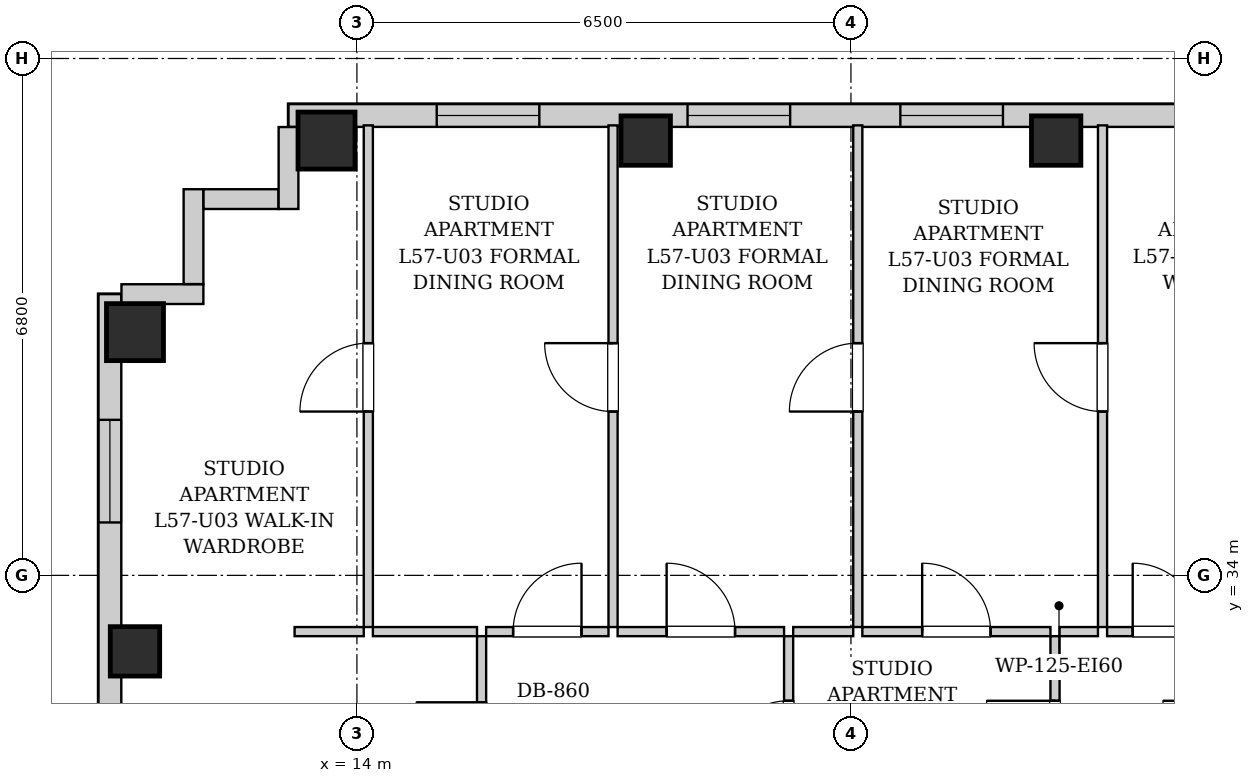
"""IFC4 building model, lengths in metres.
Left out: names, types, materials, properties, quantities, classifications, styles, units other than length and angle.
Written with IfcOpenShell. Run it as: python <this file> out.ifc"""

import sys

from ifc_helpers import new_model, si_unit, direction, frame, frame_2d, origin, origin_2d, place, context, subcontext, project, spatial, rectangle, extrude, element, fill, save


model = new_model("IFC4")
c1 = context("Model", 3, precision=1e-05, world=origin(), true_north=direction((0.0, 1.0)))
c2 = subcontext(c1, "Body", "Model", "MODEL_VIEW")
j1 = project(units=[si_unit("LENGTHUNIT", "METRE"), si_unit("PLANEANGLEUNIT", "RADIAN")], contexts=[c1])
p1 = place(None, origin())
s1 = spatial("IfcSite", under=j1, at=p1, CompositionType="ELEMENT")
p2 = place(p1, origin())
s2 = spatial("IfcBuilding", under=s1, at=p2, CompositionType="ELEMENT")
p3 = place(p2, frame((0.0, 0.0, 197.5)))
s3 = spatial("IfcBuildingStorey", under=s2, at=p3, CompositionType="ELEMENT", Elevation=197.5)
p4 = place(p3, frame((13.6, 39.72, 0.0), z_axis=(0.0, 0.0, 1.0), x_axis=(1.0, 0.0, 0.0)))
e1 = element("IfcColumn", 1, at=p4, inside=s3, PredefinedType="COLUMN", context=c2, shape_type="SweptSolid", body=[
    extrude(rectangle(XDim=0.75, YDim=0.75, at=origin_2d()), origin(), (0.0, 0.0, 1.0), 3.3),
])
for number, where, z_axis, x_axis in (
    (2, (17.8, 39.72, 0.0), (0.0, 0.0, 1.0), (1.0, 0.0, 0.0)),
    (3, (23.2, 39.72, 0.0), (0.0, 0.0, 1.0), (1.0, 0.0, 0.0)),
    (4, (11.08, 33.0, 0.0), (0.0, 0.0, 1.0), (1.0, 0.0, 0.0)),
):
    element("IfcColumn", number, at=place(p3, frame(where, z_axis=z_axis, x_axis=x_axis)), inside=s3, PredefinedType="COLUMN", context=c2, shape_type="SweptSolid", body=[
        extrude(rectangle(XDim=0.65, YDim=0.65, at=origin_2d()), origin(), (0.0, 0.0, 1.0), 3.3),
    ])
p5 = place(p3, frame((11.08, 37.2, 0.0), z_axis=(0.0, 0.0, 1.0), x_axis=(1.0, 0.0, 0.0)))
e5 = element("IfcColumn", 5, at=p5, inside=s3, PredefinedType="COLUMN", context=c2, shape_type="SweptSolid", body=[
    extrude(rectangle(XDim=0.75, YDim=0.75, at=origin_2d()), origin(), (0.0, 0.0, 1.0), 3.3),
])
p6 = place(p3, frame((13.1, 40.05, 0.0), z_axis=(0.0, 0.0, 1.0), x_axis=(1.0, 0.0, 0.0)))
e6 = element("IfcWall", 6, at=p6, inside=s3, PredefinedType="SOLIDWALL", context=c2, shape_type="SweptSolid", body=[
    extrude(rectangle(XDim=17.7, YDim=0.3, at=frame_2d((8.85, 0.0))), origin(), (0.0, 0.0, 1.0), 3.04),
])
p7 = place(p6, frame((1.95, 0.0, 0.55)))
e7 = element("IfcOpeningElement", 7, at=p7, cuts=e6, PredefinedType="OPENING", context=c2, shape_type="SweptSolid", body=[
    extrude(rectangle(XDim=1.35, YDim=1.2, at=frame_2d((0.675, 0.6))), frame((0.0, 0.16, 0.0), z_axis=(0.0, -1.0, 0.0), x_axis=(1.0, 0.0, 0.0)), (0.0, 0.0, 1.0), 0.32),
])
p8 = place(p6, frame((5.25, 0.0, 0.55)))
e8 = element("IfcOpeningElement", 8, at=p8, cuts=e6, PredefinedType="OPENING", context=c2, shape_type="SweptSolid", body=[
    extrude(rectangle(XDim=1.35, YDim=1.2, at=frame_2d((0.675, 0.6))), frame((0.0, 0.16, 0.0), z_axis=(0.0, -1.0, 0.0), x_axis=(1.0, 0.0, 0.0)), (0.0, 0.0, 1.0), 0.32),
])
p9 = place(p6, frame((8.05, 0.0, 0.55)))
e9 = element("IfcOpeningElement", 9, at=p9, cuts=e6, PredefinedType="OPENING", context=c2, shape_type="SweptSolid", body=[
    extrude(rectangle(XDim=1.35, YDim=1.2, at=frame_2d((0.675, 0.6))), frame((0.0, 0.16, 0.0), z_axis=(0.0, -1.0, 0.0), x_axis=(1.0, 0.0, 0.0)), (0.0, 0.0, 1.0), 0.32),
])
p10 = place(p6, frame((14.85, 0.0, 0.55)))
e10 = element("IfcOpeningElement", 10, at=p10, cuts=e6, PredefinedType="OPENING", context=c2, shape_type="SweptSolid", body=[
    extrude(rectangle(XDim=1.35, YDim=1.2, at=frame_2d((0.675, 0.6))), frame((0.0, 0.16, 0.0), z_axis=(0.0, -1.0, 0.0), x_axis=(1.0, 0.0, 0.0)), (0.0, 0.0, 1.0), 0.32),
])
p11 = place(p3, frame((10.75, 6.3, 0.0), z_axis=(0.0, 0.0, 1.0), x_axis=(0.0, 1.0, 0.0)))
e11 = element("IfcWall", 11, at=p11, inside=s3, PredefinedType="SOLIDWALL", context=c2, shape_type="SweptSolid", body=[
    extrude(rectangle(XDim=31.4, YDim=0.3, at=frame_2d((15.7, 0.0))), origin(), (0.0, 0.0, 1.0), 3.04),
])
p12 = place(p11, frame((1.653, 0.0, 0.55)))
e12 = element("IfcOpeningElement", 12, at=p12, cuts=e11, PredefinedType="OPENING", context=c2, shape_type="SweptSolid", body=[
    extrude(rectangle(XDim=1.35, YDim=1.2, at=frame_2d((0.675, 0.6))), frame((0.0, 0.16, 0.0), z_axis=(0.0, -1.0, 0.0), x_axis=(1.0, 0.0, 0.0)), (0.0, 0.0, 1.0), 0.32),
])
p13 = place(p11, frame((28.396, 0.0, 0.55)))
e13 = element("IfcOpeningElement", 13, at=p13, cuts=e11, PredefinedType="OPENING", context=c2, shape_type="SweptSolid", body=[
    extrude(rectangle(XDim=1.35, YDim=1.2, at=frame_2d((0.675, 0.6))), frame((0.0, 0.16, 0.0), z_axis=(0.0, -1.0, 0.0), x_axis=(1.0, 0.0, 0.0)), (0.0, 0.0, 1.0), 0.32),
])
p14 = place(p11, frame((10.367, 0.0, 0.55)))
e14 = element("IfcOpeningElement", 14, at=p14, cuts=e11, PredefinedType="OPENING", context=c2, shape_type="SweptSolid", body=[
    extrude(rectangle(XDim=1.35, YDim=1.2, at=frame_2d((0.675, 0.6))), frame((0.0, 0.16, 0.0), z_axis=(0.0, -1.0, 0.0), x_axis=(1.0, 0.0, 0.0)), (0.0, 0.0, 1.0), 0.32),
])
p15 = place(p11, frame((19.683, 0.0, 0.55)))
e15 = element("IfcOpeningElement", 15, at=p15, cuts=e11, PredefinedType="OPENING", context=c2, shape_type="SweptSolid", body=[
    extrude(rectangle(XDim=1.35, YDim=1.2, at=frame_2d((0.675, 0.6))), frame((0.0, 0.16, 0.0), z_axis=(0.0, -1.0, 0.0), x_axis=(1.0, 0.0, 0.0)), (0.0, 0.0, 1.0), 0.32),
])
p16 = place(p3, frame((10.902, 37.7, 0.0), z_axis=(0.0, 0.0, 1.0), x_axis=(1.0, 0.0, 0.0)))
e16 = element("IfcWall", 16, at=p16, inside=s3, PredefinedType="SOLIDWALL", context=c2, shape_type="SweptSolid", body=[
    extrude(rectangle(XDim=1.078, YDim=0.26, at=frame_2d((0.539, 0.0))), origin(), (0.0, 0.0, 1.0), 3.04),
])
p17 = place(p3, frame((11.85, 37.832, 0.0), z_axis=(0.0, 0.0, 1.0), x_axis=(0.0, 1.0, 0.0)))
e17 = element("IfcWall", 17, at=p17, inside=s3, PredefinedType="SOLIDWALL", context=c2, shape_type="SweptSolid", body=[
    extrude(rectangle(XDim=1.248, YDim=0.26, at=frame_2d((0.624, 0.0))), origin(), (0.0, 0.0, 1.0), 3.04),
])
p18 = place(p3, frame((11.982, 38.95, 0.0), z_axis=(0.0, 0.0, 1.0), x_axis=(1.0, 0.0, 0.0)))
e18 = element("IfcWall", 18, at=p18, inside=s3, PredefinedType="SOLIDWALL", context=c2, shape_type="SweptSolid", body=[
    extrude(rectangle(XDim=0.986, YDim=0.26, at=frame_2d((0.493, 0.0))), origin(), (0.0, 0.0, 1.0), 3.04),
])
p19 = place(p3, frame((13.1, 38.82, 0.0), z_axis=(0.0, 0.0, 1.0), x_axis=(0.0, 1.0, 0.0)))
e19 = element("IfcWall", 19, at=p19, inside=s3, PredefinedType="SOLIDWALL", context=c2, shape_type="SweptSolid", body=[
    extrude(rectangle(XDim=1.078, YDim=0.26, at=frame_2d((0.539, 0.0))), origin(), (0.0, 0.0, 1.0), 3.04),
])
p20 = place(p3, frame((15.64, 30.6, 0.0), z_axis=(0.0, 0.0, 1.0), x_axis=(0.0, 1.0, 0.0)))
e20 = element("IfcWall", 20, at=p20, inside=s3, PredefinedType="PARTITIONING", context=c2, shape_type="SweptSolid", body=[
    extrude(rectangle(XDim=2.6, YDim=0.12, at=frame_2d((1.3, 0.0))), origin(), (0.0, 0.0, 1.0), 3.04),
])
p21 = place(p20, frame((0.87, 0.0, 0.0)))
e21 = element("IfcOpeningElement", 21, at=p21, cuts=e20, PredefinedType="OPENING", context=c2, shape_type="SweptSolid", body=[
    extrude(rectangle(XDim=0.86, YDim=2.05, at=frame_2d((0.43, 1.025))), frame((0.0, 0.07, 0.0), z_axis=(0.0, -1.0, 0.0), x_axis=(1.0, 0.0, 0.0)), (0.0, 0.0, 1.0), 0.14),
])
p22 = place(p3, frame((13.18, 33.26, 0.0), z_axis=(0.0, 0.0, 1.0), x_axis=(1.0, 0.0, 0.0)))
e22 = element("IfcWall", 22, at=p22, inside=s3, PredefinedType="PARTITIONING", context=c2, shape_type="SweptSolid", body=[
    extrude(rectangle(XDim=0.91, YDim=0.12, at=frame_2d((0.455, 0.0))), origin(), (0.0, 0.0, 1.0), 3.04),
])
p23 = place(p3, frame((14.21, 33.26, 0.0), z_axis=(0.0, 0.0, 1.0), x_axis=(1.0, 0.0, 0.0)))
e23 = element("IfcWall", 23, at=p23, inside=s3, PredefinedType="PARTITIONING", context=c2, shape_type="SweptSolid", body=[
    extrude(rectangle(XDim=1.37, YDim=0.12, at=frame_2d((0.685, 0.0))), origin(), (0.0, 0.0, 1.0), 3.04),
])
p24 = place(p3, frame((19.68, 30.6, 0.0), z_axis=(0.0, 0.0, 1.0), x_axis=(0.0, 1.0, 0.0)))
e24 = element("IfcWall", 24, at=p24, inside=s3, PredefinedType="PARTITIONING", context=c2, shape_type="SweptSolid", body=[
    extrude(rectangle(XDim=2.6, YDim=0.12, at=frame_2d((1.3, 0.0))), origin(), (0.0, 0.0, 1.0), 3.04),
])
p25 = place(p24, frame((0.85, 0.0, 0.0)))
e25 = element("IfcOpeningElement", 25, at=p25, cuts=e24, PredefinedType="OPENING", context=c2, shape_type="SweptSolid", body=[
    extrude(rectangle(XDim=0.9, YDim=2.05, at=frame_2d((0.45, 1.025))), frame((0.0, 0.07, 0.0), z_axis=(0.0, -1.0, 0.0), x_axis=(1.0, 0.0, 0.0)), (0.0, 0.0, 1.0), 0.14),
])
p26 = place(p3, frame((15.7, 33.26, 0.0), z_axis=(0.0, 0.0, 1.0), x_axis=(1.0, 0.0, 0.0)))
e26 = element("IfcWall", 26, at=p26, inside=s3, PredefinedType="PARTITIONING", context=c2, shape_type="SweptSolid", body=[
    extrude(rectangle(XDim=1.61, YDim=0.12, at=frame_2d((0.805, 0.0))), origin(), (0.0, 0.0, 1.0), 3.04),
])
p27 = place(p26, frame((0.355, 0.0, 0.0)))
e27 = element("IfcOpeningElement", 27, at=p27, cuts=e26, PredefinedType="OPENING", context=c2, shape_type="SweptSolid", body=[
    extrude(rectangle(XDim=0.9, YDim=2.05, at=frame_2d((0.45, 1.025))), frame((0.0, 0.07, 0.0), z_axis=(0.0, -1.0, 0.0), x_axis=(1.0, 0.0, 0.0)), (0.0, 0.0, 1.0), 0.14),
])
p28 = place(p3, frame((17.43, 33.26, 0.0), z_axis=(0.0, 0.0, 1.0), x_axis=(1.0, 0.0, 0.0)))
e28 = element("IfcWall", 28, at=p28, inside=s3, PredefinedType="PARTITIONING", context=c2, shape_type="SweptSolid", body=[
    extrude(rectangle(XDim=2.19, YDim=0.12, at=frame_2d((1.095, 0.0))), origin(), (0.0, 0.0, 1.0), 3.04),
])
p29 = place(p28, frame((0.645, 0.0, 0.0)))
e29 = element("IfcOpeningElement", 29, at=p29, cuts=e28, PredefinedType="OPENING", context=c2, shape_type="SweptSolid", body=[
    extrude(rectangle(XDim=0.9, YDim=2.05, at=frame_2d((0.45, 1.025))), frame((0.0, 0.07, 0.0), z_axis=(0.0, -1.0, 0.0), x_axis=(1.0, 0.0, 0.0)), (0.0, 0.0, 1.0), 0.14),
])
p30 = place(p3, frame((23.185, 30.6, 0.0), z_axis=(0.0, 0.0, 1.0), x_axis=(0.0, 1.0, 0.0)))
e30 = element("IfcWall", 30, at=p30, inside=s3, PredefinedType="PARTITIONING", context=c2, shape_type="SweptSolid", body=[
    extrude(rectangle(XDim=2.6, YDim=0.12, at=frame_2d((1.3, 0.0))), origin(), (0.0, 0.0, 1.0), 3.04),
])
p31 = place(p30, frame((0.85, 0.0, 0.0)))
e31 = element("IfcOpeningElement", 31, at=p31, cuts=e30, PredefinedType="OPENING", context=c2, shape_type="SweptSolid", body=[
    extrude(rectangle(XDim=0.9, YDim=2.05, at=frame_2d((0.45, 1.025))), frame((0.0, 0.07, 0.0), z_axis=(0.0, -1.0, 0.0), x_axis=(1.0, 0.0, 0.0)), (0.0, 0.0, 1.0), 0.14),
])
p32 = place(p3, frame((19.74, 33.26, 0.0), z_axis=(0.0, 0.0, 1.0), x_axis=(1.0, 0.0, 0.0)))
e32 = element("IfcWall", 32, at=p32, inside=s3, PredefinedType="PARTITIONING", context=c2, shape_type="SweptSolid", body=[
    extrude(rectangle(XDim=0.79, YDim=0.12, at=frame_2d((0.395, 0.0))), origin(), (0.0, 0.0, 1.0), 3.04),
])
p33 = place(p3, frame((20.65, 33.26, 0.0), z_axis=(0.0, 0.0, 1.0), x_axis=(1.0, 0.0, 0.0)))
e33 = element("IfcWall", 33, at=p33, inside=s3, PredefinedType="PARTITIONING", context=c2, shape_type="SweptSolid", body=[
    extrude(rectangle(XDim=2.475, YDim=0.12, at=frame_2d((1.238, 0.0))), origin(), (0.0, 0.0, 1.0), 3.04),
])
p34 = place(p33, frame((0.787, 0.0, 0.0)))
e34 = element("IfcOpeningElement", 34, at=p34, cuts=e33, PredefinedType="OPENING", context=c2, shape_type="SweptSolid", body=[
    extrude(rectangle(XDim=0.9, YDim=2.05, at=frame_2d((0.45, 1.025))), frame((0.0, 0.07, 0.0), z_axis=(0.0, -1.0, 0.0), x_axis=(1.0, 0.0, 0.0)), (0.0, 0.0, 1.0), 0.14),
])
p35 = place(p3, frame((23.245, 33.26, 0.0), z_axis=(0.0, 0.0, 1.0), x_axis=(1.0, 0.0, 0.0)))
e35 = element("IfcWall", 35, at=p35, inside=s3, PredefinedType="PARTITIONING", context=c2, shape_type="SweptSolid", body=[
    extrude(rectangle(XDim=0.505, YDim=0.12, at=frame_2d((0.252, 0.0))), origin(), (0.0, 0.0, 1.0), 3.04),
])
p36 = place(p3, frame((23.87, 33.26, 0.0), z_axis=(0.0, 0.0, 1.0), x_axis=(1.0, 0.0, 0.0)))
e36 = element("IfcWall", 36, at=p36, inside=s3, PredefinedType="PARTITIONING", context=c2, shape_type="SweptSolid", body=[
    extrude(rectangle(XDim=1.575, YDim=0.12, at=frame_2d((0.788, 0.0))), origin(), (0.0, 0.0, 1.0), 3.04),
])
p37 = place(p36, frame((0.337, 0.0, 0.0)))
e37 = element("IfcOpeningElement", 37, at=p37, cuts=e36, PredefinedType="OPENING", context=c2, shape_type="SweptSolid", body=[
    extrude(rectangle(XDim=0.9, YDim=2.05, at=frame_2d((0.45, 1.025))), frame((0.0, 0.07, 0.0), z_axis=(0.0, -1.0, 0.0), x_axis=(1.0, 0.0, 0.0)), (0.0, 0.0, 1.0), 0.14),
])
p38 = place(p3, frame((14.15, 33.32, 0.0), z_axis=(0.0, 0.0, 1.0), x_axis=(0.0, 1.0, 0.0)))
e38 = element("IfcWall", 38, at=p38, inside=s3, PredefinedType="PARTITIONING", context=c2, shape_type="SweptSolid", body=[
    extrude(rectangle(XDim=6.6, YDim=0.12, at=frame_2d((3.3, 0.0))), origin(), (0.0, 0.0, 1.0), 3.04),
])
p39 = place(p38, frame((2.835, 0.0, 0.0)))
e39 = element("IfcOpeningElement", 39, at=p39, cuts=e38, PredefinedType="OPENING", context=c2, shape_type="SweptSolid", body=[
    extrude(rectangle(XDim=0.9, YDim=2.05, at=frame_2d((0.45, 1.025))), frame((0.0, 0.07, 0.0), z_axis=(0.0, -1.0, 0.0), x_axis=(1.0, 0.0, 0.0)), (0.0, 0.0, 1.0), 0.14),
])
p40 = place(p3, frame((17.37, 33.32, 0.0), z_axis=(0.0, 0.0, 1.0), x_axis=(0.0, 1.0, 0.0)))
e40 = element("IfcWall", 40, at=p40, inside=s3, PredefinedType="PARTITIONING", context=c2, shape_type="SweptSolid", body=[
    extrude(rectangle(XDim=6.6, YDim=0.12, at=frame_2d((3.3, 0.0))), origin(), (0.0, 0.0, 1.0), 3.04),
])
p41 = place(p40, frame((2.835, 0.0, 0.0)))
e41 = element("IfcOpeningElement", 41, at=p41, cuts=e40, PredefinedType="OPENING", context=c2, shape_type="SweptSolid", body=[
    extrude(rectangle(XDim=0.9, YDim=2.05, at=frame_2d((0.45, 1.025))), frame((0.0, 0.07, 0.0), z_axis=(0.0, -1.0, 0.0), x_axis=(1.0, 0.0, 0.0)), (0.0, 0.0, 1.0), 0.14),
])
p42 = place(p3, frame((20.59, 33.32, 0.0), z_axis=(0.0, 0.0, 1.0), x_axis=(0.0, 1.0, 0.0)))
e42 = element("IfcWall", 42, at=p42, inside=s3, PredefinedType="PARTITIONING", context=c2, shape_type="SweptSolid", body=[
    extrude(rectangle(XDim=6.6, YDim=0.12, at=frame_2d((3.3, 0.0))), origin(), (0.0, 0.0, 1.0), 3.04),
])
p43 = place(p42, frame((2.835, 0.0, 0.0)))
e43 = element("IfcOpeningElement", 43, at=p43, cuts=e42, PredefinedType="OPENING", context=c2, shape_type="SweptSolid", body=[
    extrude(rectangle(XDim=0.9, YDim=2.05, at=frame_2d((0.45, 1.025))), frame((0.0, 0.07, 0.0), z_axis=(0.0, -1.0, 0.0), x_axis=(1.0, 0.0, 0.0)), (0.0, 0.0, 1.0), 0.14),
])
p44 = place(p3, frame((23.81, 33.32, 0.0), z_axis=(0.0, 0.0, 1.0), x_axis=(0.0, 1.0, 0.0)))
e44 = element("IfcWall", 44, at=p44, inside=s3, PredefinedType="PARTITIONING", context=c2, shape_type="SweptSolid", body=[
    extrude(rectangle(XDim=6.6, YDim=0.12, at=frame_2d((3.3, 0.0))), origin(), (0.0, 0.0, 1.0), 3.04),
])
p45 = place(p44, frame((2.835, 0.0, 0.0)))
e45 = element("IfcOpeningElement", 45, at=p45, cuts=e44, PredefinedType="OPENING", context=c2, shape_type="SweptSolid", body=[
    extrude(rectangle(XDim=0.9, YDim=2.05, at=frame_2d((0.45, 1.025))), frame((0.0, 0.07, 0.0), z_axis=(0.0, -1.0, 0.0), x_axis=(1.0, 0.0, 0.0)), (0.0, 0.0, 1.0), 0.14),
])
p46 = place(p21, origin())
e46 = element("IfcDoor", 46, at=p46, inside=s3, OperationType="SINGLE_SWING_RIGHT", PredefinedType="DOOR", context=c2, shape_type="SweptSolid", body=[
    extrude(rectangle(XDim=0.86, YDim=2.05, at=frame_2d((0.43, 1.025))), frame((0.0, 0.025, 0.0), z_axis=(0.0, -1.0, 0.0), x_axis=(1.0, 0.0, 0.0)), (0.0, 0.0, 1.0), 0.05),
])
fill(e21, e46)
p47 = place(p25, origin())
e47 = element("IfcDoor", 47, at=p47, inside=s3, OperationType="SINGLE_SWING_LEFT", PredefinedType="DOOR", context=c2, shape_type="SweptSolid", body=[
    extrude(rectangle(XDim=0.9, YDim=2.05, at=frame_2d((0.45, 1.025))), frame((0.0, 0.025, 0.0), z_axis=(0.0, -1.0, 0.0), x_axis=(1.0, 0.0, 0.0)), (0.0, 0.0, 1.0), 0.05),
])
fill(e25, e47)
p48 = place(p27, origin())
e48 = element("IfcDoor", 48, at=p48, inside=s3, OperationType="SINGLE_SWING_RIGHT", PredefinedType="DOOR", context=c2, shape_type="SweptSolid", body=[
    extrude(rectangle(XDim=0.9, YDim=2.05, at=frame_2d((0.45, 1.025))), frame((0.0, 0.025, 0.0), z_axis=(0.0, -1.0, 0.0), x_axis=(1.0, 0.0, 0.0)), (0.0, 0.0, 1.0), 0.05),
])
fill(e27, e48)
p49 = place(p29, origin())
e49 = element("IfcDoor", 49, at=p49, inside=s3, OperationType="SINGLE_SWING_LEFT", PredefinedType="DOOR", context=c2, shape_type="SweptSolid", body=[
    extrude(rectangle(XDim=0.9, YDim=2.05, at=frame_2d((0.45, 1.025))), frame((0.0, 0.025, 0.0), z_axis=(0.0, -1.0, 0.0), x_axis=(1.0, 0.0, 0.0)), (0.0, 0.0, 1.0), 0.05),
])
fill(e29, e49)
p50 = place(p31, origin())
e50 = element("IfcDoor", 50, at=p50, inside=s3, OperationType="SINGLE_SWING_RIGHT", PredefinedType="DOOR", context=c2, shape_type="SweptSolid", body=[
    extrude(rectangle(XDim=0.9, YDim=2.05, at=frame_2d((0.45, 1.025))), frame((0.0, 0.025, 0.0), z_axis=(0.0, -1.0, 0.0), x_axis=(1.0, 0.0, 0.0)), (0.0, 0.0, 1.0), 0.05),
])
fill(e31, e50)
p51 = place(p34, origin())
e51 = element("IfcDoor", 51, at=p51, inside=s3, OperationType="SINGLE_SWING_LEFT", PredefinedType="DOOR", context=c2, shape_type="SweptSolid", body=[
    extrude(rectangle(XDim=0.9, YDim=2.05, at=frame_2d((0.45, 1.025))), frame((0.0, 0.025, 0.0), z_axis=(0.0, -1.0, 0.0), x_axis=(1.0, 0.0, 0.0)), (0.0, 0.0, 1.0), 0.05),
])
fill(e34, e51)
p52 = place(p37, origin())
e52 = element("IfcDoor", 52, at=p52, inside=s3, OperationType="SINGLE_SWING_LEFT", PredefinedType="DOOR", context=c2, shape_type="SweptSolid", body=[
    extrude(rectangle(XDim=0.9, YDim=2.05, at=frame_2d((0.45, 1.025))), frame((0.0, 0.025, 0.0), z_axis=(0.0, -1.0, 0.0), x_axis=(1.0, 0.0, 0.0)), (0.0, 0.0, 1.0), 0.05),
])
fill(e37, e52)
p53 = place(p39, origin())
e53 = element("IfcDoor", 53, at=p53, inside=s3, OperationType="SINGLE_SWING_LEFT", PredefinedType="DOOR", context=c2, shape_type="SweptSolid", body=[
    extrude(rectangle(XDim=0.9, YDim=2.05, at=frame_2d((0.45, 1.025))), frame((0.0, 0.025, 0.0), z_axis=(0.0, -1.0, 0.0), x_axis=(1.0, 0.0, 0.0)), (0.0, 0.0, 1.0), 0.05),
])
fill(e39, e53)
p54 = place(p41, origin())
e54 = element("IfcDoor", 54, at=p54, inside=s3, OperationType="SINGLE_SWING_RIGHT", PredefinedType="DOOR", context=c2, shape_type="SweptSolid", body=[
    extrude(rectangle(XDim=0.9, YDim=2.05, at=frame_2d((0.45, 1.025))), frame((0.0, 0.025, 0.0), z_axis=(0.0, -1.0, 0.0), x_axis=(1.0, 0.0, 0.0)), (0.0, 0.0, 1.0), 0.05),
])
fill(e41, e54)
p55 = place(p43, origin())
e55 = element("IfcDoor", 55, at=p55, inside=s3, OperationType="SINGLE_SWING_LEFT", PredefinedType="DOOR", context=c2, shape_type="SweptSolid", body=[
    extrude(rectangle(XDim=0.9, YDim=2.05, at=frame_2d((0.45, 1.025))), frame((0.0, 0.025, 0.0), z_axis=(0.0, -1.0, 0.0), x_axis=(1.0, 0.0, 0.0)), (0.0, 0.0, 1.0), 0.05),
])
fill(e43, e55)
p56 = place(p45, origin())
e56 = element("IfcDoor", 56, at=p56, inside=s3, OperationType="SINGLE_SWING_RIGHT", PredefinedType="DOOR", context=c2, shape_type="SweptSolid", body=[
    extrude(rectangle(XDim=0.9, YDim=2.05, at=frame_2d((0.45, 1.025))), frame((0.0, 0.025, 0.0), z_axis=(0.0, -1.0, 0.0), x_axis=(1.0, 0.0, 0.0)), (0.0, 0.0, 1.0), 0.05),
])
fill(e45, e56)
p57 = place(p13, origin())
e57 = element("IfcWindow", 57, at=p57, inside=s3, PartitioningType="SINGLE_PANEL", PredefinedType="WINDOW", context=c2, shape_type="SweptSolid", body=[
    extrude(rectangle(XDim=1.35, YDim=1.2, at=frame_2d((0.675, 0.6))), frame((0.0, 0.03, 0.0), z_axis=(0.0, -1.0, 0.0), x_axis=(1.0, 0.0, 0.0)), (0.0, 0.0, 1.0), 0.06),
])
fill(e13, e57)
p58 = place(p7, origin())
e58 = element("IfcWindow", 58, at=p58, inside=s3, PartitioningType="SINGLE_PANEL", PredefinedType="WINDOW", context=c2, shape_type="SweptSolid", body=[
    extrude(rectangle(XDim=1.35, YDim=1.2, at=frame_2d((0.675, 0.6))), frame((0.0, 0.03, 0.0), z_axis=(0.0, -1.0, 0.0), x_axis=(1.0, 0.0, 0.0)), (0.0, 0.0, 1.0), 0.06),
])
fill(e7, e58)
p59 = place(p8, origin())
e59 = element("IfcWindow", 59, at=p59, inside=s3, PartitioningType="SINGLE_PANEL", PredefinedType="WINDOW", context=c2, shape_type="SweptSolid", body=[
    extrude(rectangle(XDim=1.35, YDim=1.2, at=frame_2d((0.675, 0.6))), frame((0.0, 0.03, 0.0), z_axis=(0.0, -1.0, 0.0), x_axis=(1.0, 0.0, 0.0)), (0.0, 0.0, 1.0), 0.06),
])
fill(e8, e59)
p60 = place(p9, origin())
e60 = element("IfcWindow", 60, at=p60, inside=s3, PartitioningType="SINGLE_PANEL", PredefinedType="WINDOW", context=c2, shape_type="SweptSolid", body=[
    extrude(rectangle(XDim=1.35, YDim=1.2, at=frame_2d((0.675, 0.6))), frame((0.0, 0.03, 0.0), z_axis=(0.0, -1.0, 0.0), x_axis=(1.0, 0.0, 0.0)), (0.0, 0.0, 1.0), 0.06),
])
fill(e9, e60)
save(model, sys.argv[1])
